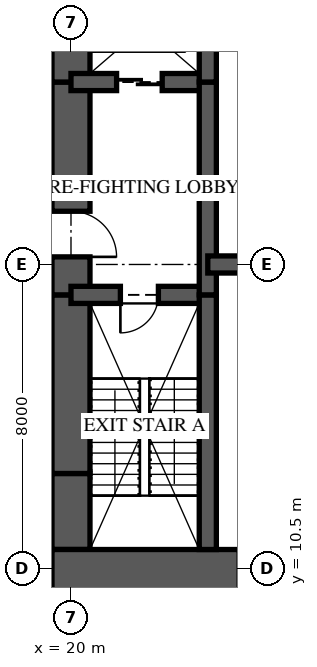
"""IFC4 building model, lengths in metres.
Left out: names, types, materials, properties, quantities, classifications, styles, units other than length and angle.
Written with IfcOpenShell. Run it as: python <this file> out.ifc"""

import sys

from ifc_helpers import new_model, si_unit, direction, frame, frame_2d, origin, place, context, subcontext, project, spatial, rectangle, extrude, element, fill, save


model = new_model("IFC4")
c1 = context("Model", 3, precision=1e-05, world=origin(), true_north=direction((0.0, 1.0)))
c2 = subcontext(c1, "Body", "Model", "MODEL_VIEW")
j1 = project(units=[si_unit("LENGTHUNIT", "METRE"), si_unit("PLANEANGLEUNIT", "RADIAN")], contexts=[c1])
p1 = place(None, origin())
s1 = spatial("IfcSite", under=j1, at=p1, CompositionType="ELEMENT")
p2 = place(p1, origin())
s2 = spatial("IfcBuilding", under=s1, at=p2, CompositionType="ELEMENT")
p3 = place(p2, frame((0.0, 0.0, -4.0)))
s3 = spatial("IfcBuildingStorey", under=s2, at=p3, CompositionType="ELEMENT", Elevation=-4.0)
p4 = place(p3, frame((19.5, 10.125, 0.0), z_axis=(0.0, 0.0, 1.0), x_axis=(1.0, 0.0, 0.0)))
e1 = element("IfcWall", 1, at=p4, inside=s3, PredefinedType="SHEAR", context=c2, shape_type="SweptSolid", body=[
    extrude(rectangle(XDim=6.5, YDim=1.75, at=frame_2d((3.25, 0.0))), origin(), (0.0, 0.0, 1.0), 4.0),
])
p5 = place(p4, frame((4.925, 0.0, 0.0)))
e2 = element("IfcOpeningElement", 2, at=p5, cuts=e1, PredefinedType="OPENING", context=c2, shape_type="SweptSolid", body=[
    extrude(rectangle(XDim=0.75, YDim=2.1, at=frame_2d((0.375, 1.05))), frame((0.0, 0.885, 0.0), z_axis=(0.0, -1.0, 0.0), x_axis=(1.0, 0.0, 0.0)), (0.0, 0.0, 1.0), 1.77),
])
p6 = place(p3, frame((20.0, 26.0, 0.0), z_axis=(0.0, 0.0, 1.0), x_axis=(0.0, -1.0, 0.0)))
e3 = element("IfcWall", 3, at=p6, inside=s3, PredefinedType="SHEAR", context=c2, shape_type="SweptSolid", body=[
    extrude(rectangle(XDim=2.7, YDim=1.0, at=frame_2d((1.35, 0.0))), origin(), (0.0, 0.0, 1.0), 4.0),
])
p7 = place(p3, frame((20.0, 23.3, 0.0), z_axis=(0.0, 0.0, 1.0), x_axis=(0.0, -1.0, 0.0)))
e4 = element("IfcWall", 4, at=p7, inside=s3, PredefinedType="SHEAR", context=c2, shape_type="SweptSolid", body=[
    extrude(rectangle(XDim=5.6, YDim=1.0, at=frame_2d((2.8, 0.0))), origin(), (0.0, 0.0, 1.0), 4.0),
])
p8 = place(p7, frame((3.4, 0.0, 0.0)))
e5 = element("IfcOpeningElement", 5, at=p8, cuts=e4, PredefinedType="OPENING", context=c2, shape_type="SweptSolid", body=[
    extrude(rectangle(XDim=1.2, YDim=2.2, at=frame_2d((0.6, 1.1))), frame((0.0, 0.51, 0.0), z_axis=(0.0, -1.0, 0.0), x_axis=(1.0, 0.0, 0.0)), (0.0, 0.0, 1.0), 1.02),
])
p9 = place(p3, frame((20.0, 17.7, 0.0), z_axis=(0.0, 0.0, 1.0), x_axis=(0.0, -1.0, 0.0)))
e6 = element("IfcWall", 6, at=p9, inside=s3, PredefinedType="SHEAR", context=c2, shape_type="SweptSolid", body=[
    extrude(rectangle(XDim=4.7, YDim=1.0, at=frame_2d((2.35, 0.0))), origin(), (0.0, 0.0, 1.0), 4.0),
])
p10 = place(p3, frame((20.0, 13.0, 0.0), z_axis=(0.0, 0.0, 1.0), x_axis=(0.0, -1.0, 0.0)))
e7 = element("IfcWall", 7, at=p10, inside=s3, PredefinedType="SHEAR", context=c2, shape_type="SweptSolid", body=[
    extrude(rectangle(XDim=2.0, YDim=1.0, at=frame_2d((1.0, 0.0))), origin(), (0.0, 0.0, 1.0), 4.0),
])
p11 = place(p3, frame((23.6, 11.0, 0.0), z_axis=(0.0, 0.0, 1.0), x_axis=(0.0, 1.0, 0.0)))
e8 = element("IfcWall", 8, at=p11, inside=s3, PredefinedType="SHEAR", context=c2, shape_type="SweptSolid", body=[
    extrude(rectangle(XDim=6.7, YDim=0.45, at=frame_2d((3.35, 0.0))), origin(), (0.0, 0.0, 1.0), 4.0),
])
p12 = place(p3, frame((23.6, 17.7, 0.0), z_axis=(0.0, 0.0, 1.0), x_axis=(0.0, 1.0, 0.0)))
e9 = element("IfcWall", 9, at=p12, inside=s3, PredefinedType="SHEAR", context=c2, shape_type="SweptSolid", body=[
    extrude(rectangle(XDim=5.6, YDim=0.45, at=frame_2d((2.8, 0.0))), origin(), (0.0, 0.0, 1.0), 4.0),
])
p13 = place(p3, frame((23.6, 23.3, 0.0), z_axis=(0.0, 0.0, 1.0), x_axis=(0.0, 1.0, 0.0)))
e10 = element("IfcWall", 10, at=p13, inside=s3, PredefinedType="SHEAR", context=c2, shape_type="SweptSolid", body=[
    extrude(rectangle(XDim=2.7, YDim=0.45, at=frame_2d((1.35, 0.0))), origin(), (0.0, 0.0, 1.0), 4.0),
])
p14 = place(p3, frame((20.0, 17.7, 0.0), z_axis=(0.0, 0.0, 1.0), x_axis=(1.0, 0.0, 0.0)))
e11 = element("IfcWall", 11, at=p14, inside=s3, PredefinedType="SHEAR", context=c2, shape_type="SweptSolid", body=[
    extrude(rectangle(XDim=3.6, YDim=0.45, at=frame_2d((1.8, 0.0))), origin(), (0.0, 0.0, 1.0), 4.0),
])
p15 = place(p14, frame((1.3, 0.0, 0.0)))
e12 = element("IfcOpeningElement", 12, at=p15, cuts=e11, PredefinedType="OPENING", context=c2, shape_type="SweptSolid", body=[
    extrude(rectangle(XDim=1.0, YDim=2.1, at=frame_2d((0.5, 1.05))), frame((0.0, 0.235, 0.0), z_axis=(0.0, -1.0, 0.0), x_axis=(1.0, 0.0, 0.0)), (0.0, 0.0, 1.0), 0.47),
])
p16 = place(p3, frame((20.0, 23.3, 0.0), z_axis=(0.0, 0.0, 1.0), x_axis=(1.0, 0.0, 0.0)))
e13 = element("IfcWall", 13, at=p16, inside=s3, PredefinedType="SHEAR", context=c2, shape_type="SweptSolid", body=[
    extrude(rectangle(XDim=3.6, YDim=0.45, at=frame_2d((1.8, 0.0))), origin(), (0.0, 0.0, 1.0), 4.0),
])
p17 = place(p16, frame((1.2, 0.0, 0.0)))
e14 = element("IfcOpeningElement", 14, at=p17, cuts=e13, PredefinedType="OPENING", context=c2, shape_type="SweptSolid", body=[
    extrude(rectangle(XDim=1.2, YDim=2.1, at=frame_2d((0.6, 1.05))), frame((0.0, 0.235, 0.0), z_axis=(0.0, -1.0, 0.0), x_axis=(1.0, 0.0, 0.0)), (0.0, 0.0, 1.0), 0.47),
])
p18 = place(p3, frame((23.6, 18.5, 0.0), z_axis=(0.0, 0.0, 1.0), x_axis=(1.0, 0.0, 0.0)))
e15 = element("IfcWall", 15, at=p18, inside=s3, PredefinedType="SHEAR", context=c2, shape_type="SweptSolid", body=[
    extrude(rectangle(XDim=2.4, YDim=0.45, at=frame_2d((1.2, 0.0))), origin(), (0.0, 0.0, 1.0), 4.0),
])
p19 = place(p15, frame((1.0, 0.0, 0.0), z_axis=(0.0, 0.0, 1.0), x_axis=(-1.0, 0.0, 0.0)))
e16 = element("IfcDoor", 16, at=p19, inside=s3, OperationType="SINGLE_SWING_RIGHT", PredefinedType="DOOR", context=c2, shape_type="SweptSolid", body=[
    extrude(rectangle(XDim=1.0, YDim=2.1, at=frame_2d((0.5, 1.05))), frame((0.0, 0.025, 0.0), z_axis=(0.0, -1.0, 0.0), x_axis=(1.0, 0.0, 0.0)), (0.0, 0.0, 1.0), 0.05),
])
fill(e12, e16)
p20 = place(p8, origin())
e17 = element("IfcDoor", 17, at=p20, inside=s3, OperationType="SINGLE_SWING_RIGHT", PredefinedType="DOOR", context=c2, shape_type="SweptSolid", body=[
    extrude(rectangle(XDim=1.2, YDim=2.2, at=frame_2d((0.6, 1.1))), frame((0.0, 0.025, 0.0), z_axis=(0.0, -1.0, 0.0), x_axis=(1.0, 0.0, 0.0)), (0.0, 0.0, 1.0), 0.05),
])
fill(e5, e17)
p21 = place(p17, origin())
e18 = element("IfcDoor", 18, at=p21, inside=s3, OperationType="SLIDING_TO_LEFT", PredefinedType="DOOR", context=c2, shape_type="SweptSolid", body=[
    extrude(rectangle(XDim=1.2, YDim=2.1, at=frame_2d((0.6, 1.05))), frame((0.0, 0.025, 0.0), z_axis=(0.0, -1.0, 0.0), x_axis=(1.0, 0.0, 0.0)), (0.0, 0.0, 1.0), 0.05),
])
fill(e14, e18)
save(model, sys.argv[1])
